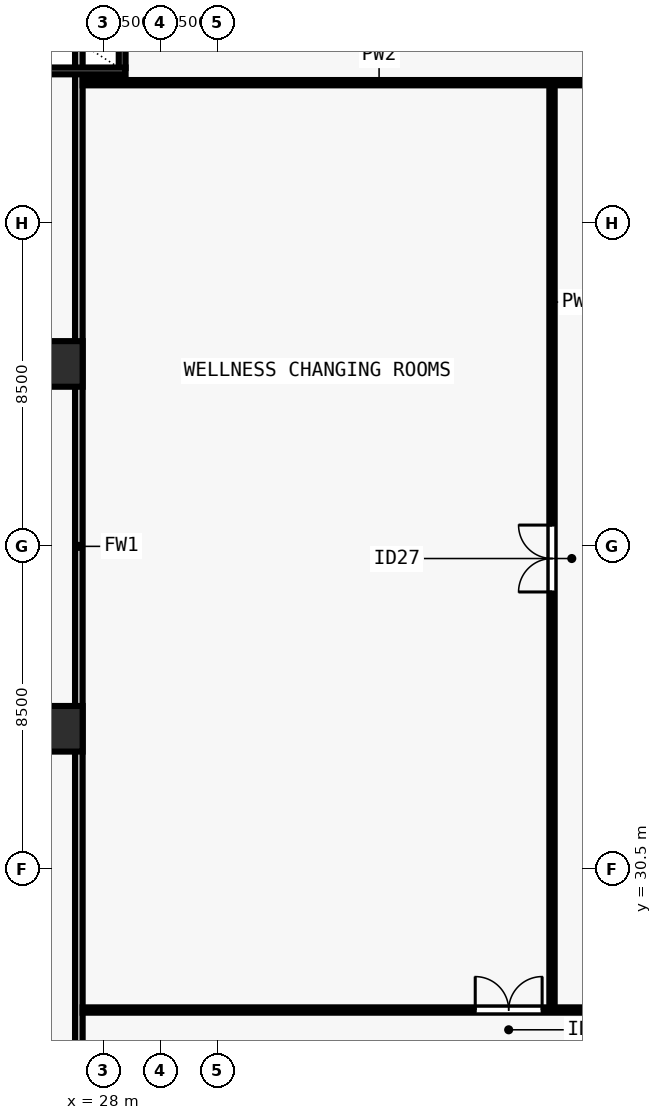
"""IFC4 building model, lengths in metres.
Left out: names, types, materials, properties, quantities, classifications, styles, units other than length and angle.
Written with IfcOpenShell. Run it as: python <this file> out.ifc"""

import sys

from ifc_helpers import new_model, si_unit, direction, frame, frame_2d, origin, origin_2d, place, context, subcontext, project, spatial, rectangle, extrude, element, fill, save


model = new_model("IFC4")
c1 = context("Model", 3, precision=1e-05, world=origin(), true_north=direction((0.0, 1.0)))
c2 = subcontext(c1, "Body", "Model", "MODEL_VIEW")
j1 = project(units=[si_unit("LENGTHUNIT", "METRE"), si_unit("PLANEANGLEUNIT", "RADIAN")], contexts=[c1])
p1 = place(None, origin())
s1 = spatial("IfcSite", under=j1, at=p1, CompositionType="ELEMENT")
p2 = place(p1, origin())
s2 = spatial("IfcBuilding", under=s1, at=p2, CompositionType="ELEMENT")
p3 = place(p2, frame((0.0, 0.0, 19.0)))
s3 = spatial("IfcBuildingStorey", under=s2, at=p3, CompositionType="ELEMENT", Elevation=19.0)
for number, where, z_axis, x_axis in (
    (1, (26.85, 43.8, 0.0), (0.0, 0.0, 1.0), (1.0, 0.0, 0.0)),
    (2, (26.85, 34.2, 0.0), (0.0, 0.0, 1.0), (1.0, 0.0, 0.0)),
):
    element("IfcColumn", number, at=place(p3, frame(where, z_axis=z_axis, x_axis=x_axis)), inside=s3, PredefinedType="COLUMN", context=c2, shape_type="SweptSolid", body=[
        extrude(rectangle(XDim=1.2, YDim=1.2, at=origin_2d()), origin(), (0.0, 0.0, 1.0), 4.5),
    ])
p4 = place(p3, frame((27.35, 14.6, 0.0), z_axis=(0.0, 0.0, 1.0), x_axis=(0.0, 1.0, 0.0)))
e3 = element("IfcWall", 3, at=p4, inside=s3, PredefinedType="SOLIDWALL", context=c2, shape_type="SweptSolid", body=[
    extrude(rectangle(XDim=48.8, YDim=0.2, at=frame_2d((24.4, 0.0))), origin(), (0.0, 0.0, 1.0), 2.455),
])
p5 = place(p3, frame((27.45, 26.8, 0.0), z_axis=(0.0, 0.0, 1.0), x_axis=(1.0, 0.0, 0.0)))
e4 = element("IfcWall", 4, at=p5, inside=s3, PredefinedType="PARTITIONING", context=c2, shape_type="SweptSolid", body=[
    extrude(rectangle(XDim=49.1, YDim=0.14, at=frame_2d((24.55, 0.0))), origin(), (0.0, 0.0, 1.0), 3.798),
])
p6 = place(p5, frame((10.33, 0.0, 0.0)))
e5 = element("IfcOpeningElement", 5, at=p6, cuts=e4, PredefinedType="OPENING", context=c2, shape_type="SweptSolid", body=[
    extrude(rectangle(XDim=1.76, YDim=2.2, at=frame_2d((0.88, 1.1))), frame((0.0, 0.08, 0.0), z_axis=(0.0, -1.0, 0.0), x_axis=(1.0, 0.0, 0.0)), (0.0, 0.0, 1.0), 0.16),
])
p7 = place(p5, frame((32.55, 0.0, 0.0)))
e6 = element("IfcOpeningElement", 6, at=p7, cuts=e4, PredefinedType="OPENING", context=c2, shape_type="SweptSolid", body=[
    extrude(rectangle(XDim=1.76, YDim=2.2, at=frame_2d((0.88, 1.1))), frame((0.0, 0.08, 0.0), z_axis=(0.0, -1.0, 0.0), x_axis=(1.0, 0.0, 0.0)), (0.0, 0.0, 1.0), 0.16),
])
p8 = place(p3, frame((27.45, 51.2, 0.0), z_axis=(0.0, 0.0, 1.0), x_axis=(1.0, 0.0, 0.0)))
e7 = element("IfcWall", 7, at=p8, inside=s3, PredefinedType="PARTITIONING", context=c2, shape_type="SweptSolid", body=[
    extrude(rectangle(XDim=49.1, YDim=0.14, at=frame_2d((24.55, 0.0))), origin(), (0.0, 0.0, 1.0), 3.798),
])
p9 = place(p8, frame((15.75, 0.0, 0.0)))
e8 = element("IfcOpeningElement", 8, at=p9, cuts=e7, PredefinedType="OPENING", context=c2, shape_type="SweptSolid", body=[
    extrude(rectangle(XDim=1.76, YDim=2.2, at=frame_2d((0.88, 1.1))), frame((0.0, 0.08, 0.0), z_axis=(0.0, -1.0, 0.0), x_axis=(1.0, 0.0, 0.0)), (0.0, 0.0, 1.0), 0.16),
])
p10 = place(p8, frame((28.55, 0.0, 0.0)))
e9 = element("IfcOpeningElement", 9, at=p10, cuts=e7, PredefinedType="OPENING", context=c2, shape_type="SweptSolid", body=[
    extrude(rectangle(XDim=1.76, YDim=2.2, at=frame_2d((0.88, 1.1))), frame((0.0, 0.08, 0.0), z_axis=(0.0, -1.0, 0.0), x_axis=(1.0, 0.0, 0.0)), (0.0, 0.0, 1.0), 0.16),
])
p11 = place(p8, frame((42.55, 0.0, 0.0)))
e10 = element("IfcOpeningElement", 10, at=p11, cuts=e7, PredefinedType="OPENING", context=c2, shape_type="SweptSolid", body=[
    extrude(rectangle(XDim=0.95, YDim=2.1, at=frame_2d((0.475, 1.05))), frame((0.0, 0.08, 0.0), z_axis=(0.0, -1.0, 0.0), x_axis=(1.0, 0.0, 0.0)), (0.0, 0.0, 1.0), 0.16),
])
p12 = place(p8, frame((46.75, 0.0, 0.0)))
e11 = element("IfcOpeningElement", 11, at=p12, cuts=e7, PredefinedType="OPENING", context=c2, shape_type="SweptSolid", body=[
    extrude(rectangle(XDim=1.76, YDim=2.2, at=frame_2d((0.88, 1.1))), frame((0.0, 0.08, 0.0), z_axis=(0.0, -1.0, 0.0), x_axis=(1.0, 0.0, 0.0)), (0.0, 0.0, 1.0), 0.16),
])
p13 = place(p3, frame((39.8, 26.855, 0.0), z_axis=(0.0, 0.0, 1.0), x_axis=(0.0, 1.0, 0.0)))
e12 = element("IfcWall", 12, at=p13, inside=s3, PredefinedType="PARTITIONING", context=c2, shape_type="SweptSolid", body=[
    extrude(rectangle(XDim=24.29, YDim=0.14, at=frame_2d((12.145, 0.0))), origin(), (0.0, 0.0, 1.0), 4.28),
])
p14 = place(p13, frame((10.945, 0.0, 0.0)))
e13 = element("IfcOpeningElement", 13, at=p14, cuts=e12, PredefinedType="OPENING", context=c2, shape_type="SweptSolid", body=[
    extrude(rectangle(XDim=1.76, YDim=2.2, at=frame_2d((0.88, 1.1))), frame((0.0, 0.08, 0.0), z_axis=(0.0, -1.0, 0.0), x_axis=(1.0, 0.0, 0.0)), (0.0, 0.0, 1.0), 0.16),
])
p15 = place(p3, frame((28.49, 51.585, 0.0), z_axis=(0.0, 0.0, 1.0), x_axis=(0.0, 1.0, 0.0)))
e14 = element("IfcWall", 14, at=p15, inside=s3, PredefinedType="SOLIDWALL", context=c2, shape_type="SweptSolid", body=[
    extrude(rectangle(XDim=3.47, YDim=0.18, at=frame_2d((1.735, 0.0))), origin(), (0.0, 0.0, 1.0), 4.28),
])
p16 = place(p3, frame((21.12, 51.51, 0.0), z_axis=(0.0, 0.0, 1.0), x_axis=(1.0, 0.0, 0.0)))
e15 = element("IfcWall", 15, at=p16, inside=s3, PredefinedType="SOLIDWALL", context=c2, shape_type="SweptSolid", body=[
    extrude(rectangle(XDim=7.46, YDim=0.18, at=frame_2d((3.73, 0.0))), origin(), (0.0, 0.0, 1.0), 4.28),
])
p17 = place(p6, origin())
e16 = element("IfcDoor", 16, at=p17, inside=s3, OperationType="DOUBLE_DOOR_SINGLE_SWING", PredefinedType="DOOR", context=c2, shape_type="SweptSolid", body=[
    extrude(rectangle(XDim=1.76, YDim=2.2, at=frame_2d((0.88, 1.1))), frame((0.0, 0.025, 0.0), z_axis=(0.0, -1.0, 0.0), x_axis=(1.0, 0.0, 0.0)), (0.0, 0.0, 1.0), 0.05),
])
fill(e5, e16)
p18 = place(p14, origin())
e17 = element("IfcDoor", 17, at=p18, inside=s3, OperationType="DOUBLE_DOOR_SINGLE_SWING", PredefinedType="DOOR", context=c2, shape_type="SweptSolid", body=[
    extrude(rectangle(XDim=1.76, YDim=2.2, at=frame_2d((0.88, 1.1))), frame((0.0, 0.025, 0.0), z_axis=(0.0, -1.0, 0.0), x_axis=(1.0, 0.0, 0.0)), (0.0, 0.0, 1.0), 0.05),
])
fill(e13, e17)
save(model, sys.argv[1])
